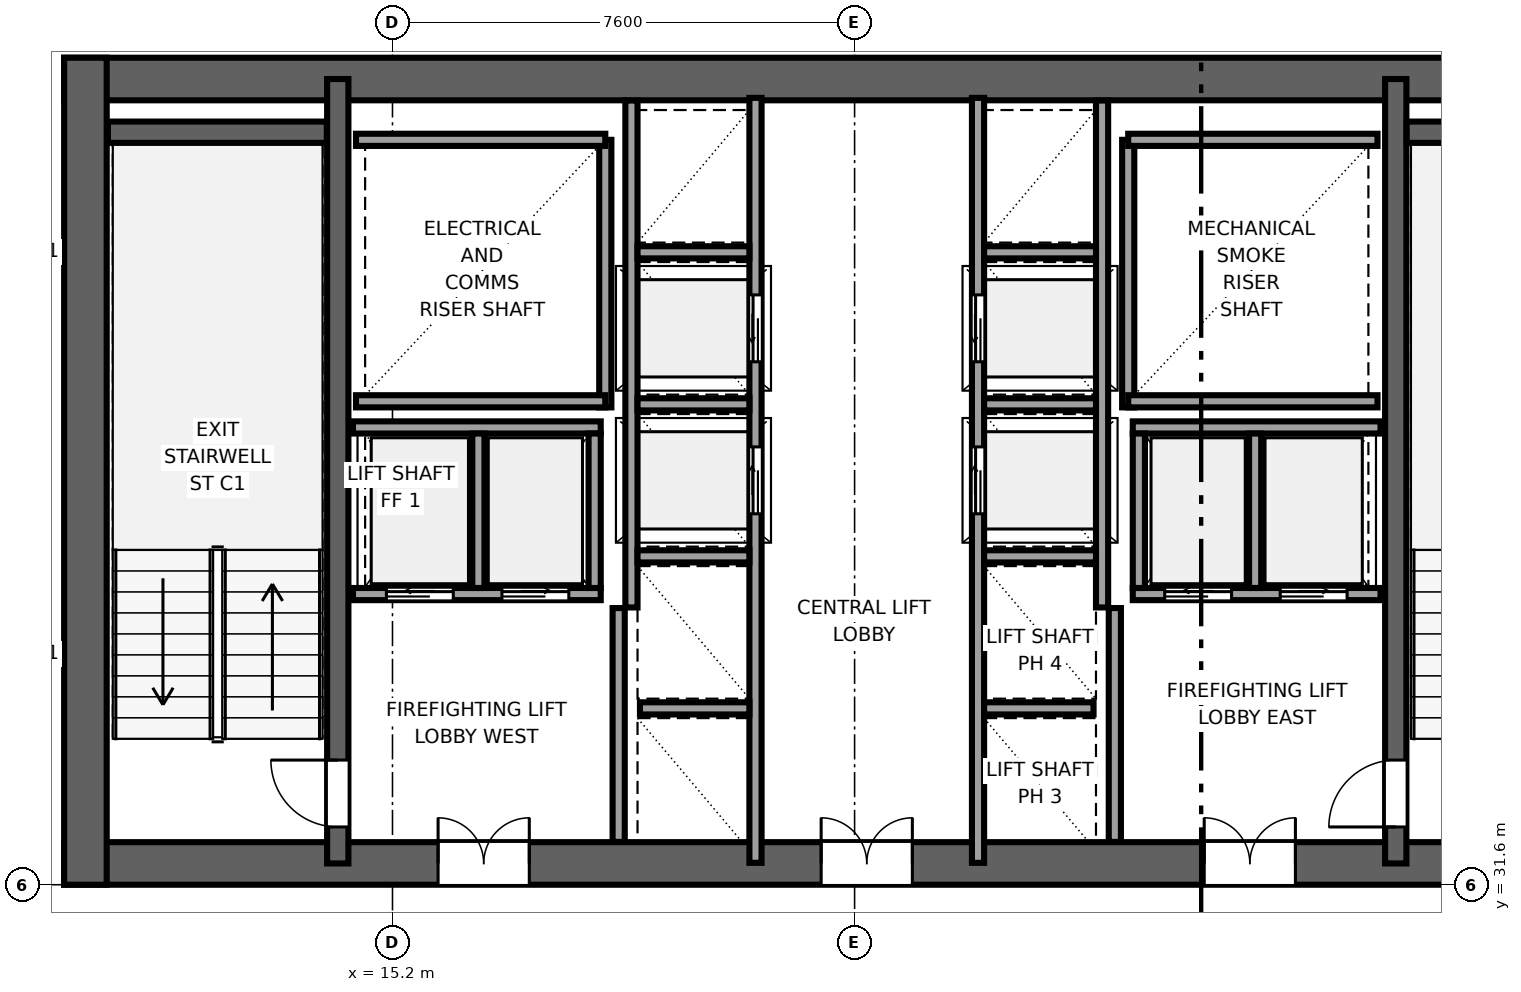
"""IFC4 building model, lengths in metres.
Left out: names, types, materials, properties, quantities, classifications, styles, units other than length and angle.
Written with IfcOpenShell. Run it as: python <this file> out.ifc"""

import sys

from ifc_helpers import new_model, si_unit, direction, frame, frame_2d, origin, place, context, subcontext, project, spatial, rectangle, extrude, source, transform, mapped, element, fill, save


model = new_model("IFC4")
c1 = context("Model", 3, precision=1e-05, world=origin(), true_north=direction((0.0, 1.0)))
c2 = subcontext(c1, "Body", "Model", "MODEL_VIEW")
j1 = project(units=[si_unit("LENGTHUNIT", "METRE"), si_unit("PLANEANGLEUNIT", "RADIAN")], contexts=[c1])
p1 = place(None, origin())
s1 = spatial("IfcSite", under=j1, at=p1, CompositionType="ELEMENT")
p2 = place(p1, origin())
s2 = spatial("IfcBuilding", under=s1, at=p2, CompositionType="ELEMENT")
p3 = place(p2, frame((0.0, 0.0, 139.95)))
s3 = spatial("IfcBuildingStorey", under=s2, at=p3, CompositionType="ELEMENT", Elevation=139.95)
p4 = place(p3, frame((9.8, 31.95, 0.0), z_axis=(0.0, 0.0, 1.0), x_axis=(1.0, 0.0, 0.0)))
e1 = element("IfcWall", 1, at=p4, inside=s3, PredefinedType="SHEAR", context=c2, shape_type="SweptSolid", body=[
    extrude(rectangle(XDim=26.4, YDim=0.7, at=frame_2d((13.2, 0.0))), origin(), (0.0, 0.0, 1.0), 3.55),
])
p5 = place(p4, frame((7.65, 0.0, 0.0), z_axis=(0.0, 0.0, 1.0), x_axis=(-1.0, 0.0, 0.0)))
e2 = element("IfcOpeningElement", 2, at=p5, cuts=e1, PredefinedType="OPENING", context=c2, shape_type="SweptSolid", body=[
    extrude(rectangle(XDim=1.5, YDim=2.04, at=frame_2d((0.75, 1.02))), frame((0.0, 0.36, 0.0), z_axis=(0.0, -1.0, 0.0), x_axis=(1.0, 0.0, 0.0)), (0.0, 0.0, 1.0), 0.72),
])
p6 = place(p4, frame((13.95, 0.0, 0.0), z_axis=(0.0, 0.0, 1.0), x_axis=(-1.0, 0.0, 0.0)))
e3 = element("IfcOpeningElement", 3, at=p6, cuts=e1, PredefinedType="OPENING", context=c2, shape_type="SweptSolid", body=[
    extrude(rectangle(XDim=1.5, YDim=2.04, at=frame_2d((0.75, 1.02))), frame((0.0, 0.36, 0.0), z_axis=(0.0, -1.0, 0.0), x_axis=(1.0, 0.0, 0.0)), (0.0, 0.0, 1.0), 0.72),
])
p7 = place(p4, frame((20.25, 0.0, 0.0), z_axis=(0.0, 0.0, 1.0), x_axis=(-1.0, 0.0, 0.0)))
e4 = element("IfcOpeningElement", 4, at=p7, cuts=e1, PredefinedType="OPENING", context=c2, shape_type="SweptSolid", body=[
    extrude(rectangle(XDim=1.5, YDim=2.04, at=frame_2d((0.75, 1.02))), frame((0.0, 0.36, 0.0), z_axis=(0.0, -1.0, 0.0), x_axis=(1.0, 0.0, 0.0)), (0.0, 0.0, 1.0), 0.72),
])
p8 = place(p3, frame((9.8, 44.85, 0.0), z_axis=(0.0, 0.0, 1.0), x_axis=(1.0, 0.0, 0.0)))
e5 = element("IfcWall", 5, at=p8, inside=s3, PredefinedType="SHEAR", context=c2, shape_type="SweptSolid", body=[
    extrude(rectangle(XDim=26.4, YDim=0.7, at=frame_2d((13.2, 0.0))), origin(), (0.0, 0.0, 1.0), 3.55),
])
p9 = place(p3, frame((10.15, 31.6, 0.0), z_axis=(0.0, 0.0, 1.0), x_axis=(0.0, 1.0, 0.0)))
e6 = element("IfcWall", 6, at=p9, inside=s3, PredefinedType="SHEAR", context=c2, shape_type="SweptSolid", body=[
    extrude(rectangle(XDim=13.6, YDim=0.7, at=frame_2d((6.8, 0.0))), origin(), (0.0, 0.0, 1.0), 3.55),
])
p10 = place(p3, frame((14.3, 31.95, 0.0), z_axis=(0.0, 0.0, 1.0), x_axis=(0.0, 1.0, 0.0)))
e7 = element("IfcWall", 7, at=p10, inside=s3, PredefinedType="SHEAR", context=c2, shape_type="SweptSolid", body=[
    extrude(rectangle(XDim=12.9, YDim=0.35, at=frame_2d((6.45, 0.0))), origin(), (0.0, 0.0, 1.0), 3.55),
])
p11 = place(p10, frame((0.6, 0.0, 0.0)))
e8 = element("IfcOpeningElement", 8, at=p11, cuts=e7, PredefinedType="OPENING", context=c2, shape_type="SweptSolid", body=[
    extrude(rectangle(XDim=1.1, YDim=2.12, at=frame_2d((0.55, 1.06))), frame((0.0, 0.185, 0.0), z_axis=(0.0, -1.0, 0.0), x_axis=(1.0, 0.0, 0.0)), (0.0, 0.0, 1.0), 0.37),
])
p12 = place(p3, frame((31.7, 31.95, 0.0), z_axis=(0.0, 0.0, 1.0), x_axis=(0.0, 1.0, 0.0)))
e9 = element("IfcWall", 9, at=p12, inside=s3, PredefinedType="SHEAR", context=c2, shape_type="SweptSolid", body=[
    extrude(rectangle(XDim=12.9, YDim=0.35, at=frame_2d((6.45, 0.0))), origin(), (0.0, 0.0, 1.0), 3.55),
])
p13 = place(p12, frame((1.7, 0.0, 0.0), z_axis=(0.0, 0.0, 1.0), x_axis=(-1.0, 0.0, 0.0)))
e10 = element("IfcOpeningElement", 10, at=p13, cuts=e9, PredefinedType="OPENING", context=c2, shape_type="SweptSolid", body=[
    extrude(rectangle(XDim=1.1, YDim=2.12, at=frame_2d((0.55, 1.06))), frame((0.0, 0.185, 0.0), z_axis=(0.0, -1.0, 0.0), x_axis=(1.0, 0.0, 0.0)), (0.0, 0.0, 1.0), 0.37),
])
for number, where, z_axis, x_axis in (
    (11, (10.52, 43.975, 0.0), (0.0, 0.0, 1.0), (1.0, 0.0, 0.0)),
    (12, (31.88, 43.975, 0.0), (0.0, 0.0, 1.0), (1.0, 0.0, 0.0)),
):
    element("IfcWall", number, at=place(p3, frame(where, z_axis=z_axis, x_axis=x_axis)), inside=s3, PredefinedType="SHEAR", context=c2, shape_type="SweptSolid", body=[
        extrude(rectangle(XDim=3.6, YDim=0.35, at=frame_2d((1.8, 0.0))), origin(), (0.0, 0.0, 1.0), 3.55),
    ])
p14 = place(p3, frame((18.7, 39.45, 0.0), z_axis=(0.0, 0.0, 1.0), x_axis=(0.0, 1.0, 0.0)))
e13 = element("IfcWall", 13, at=p14, inside=s3, PredefinedType="SOLIDWALL", context=c2, shape_type="SweptSolid", body=[
    extrude(rectangle(XDim=4.4, YDim=0.2, at=frame_2d((2.2, 0.0))), origin(), (0.0, 0.0, 1.0), 3.37),
])
for number, where, z_axis, x_axis in (
    (14, (14.6, 39.55, 0.0), (0.0, 0.0, 1.0), (1.0, 0.0, 0.0)),
    (15, (14.6, 43.85, 0.0), (0.0, 0.0, 1.0), (1.0, 0.0, 0.0)),
):
    element("IfcWall", number, at=place(p3, frame(where, z_axis=z_axis, x_axis=x_axis)), inside=s3, PredefinedType="SOLIDWALL", context=c2, shape_type="SweptSolid", body=[
        extrude(rectangle(XDim=4.1, YDim=0.2, at=frame_2d((2.05, 0.0))), origin(), (0.0, 0.0, 1.0), 3.37),
    ])
p15 = place(p3, frame((27.3, 39.45, 0.0), z_axis=(0.0, 0.0, 1.0), x_axis=(0.0, 1.0, 0.0)))
e16 = element("IfcWall", 16, at=p15, inside=s3, PredefinedType="SOLIDWALL", context=c2, shape_type="SweptSolid", body=[
    extrude(rectangle(XDim=4.4, YDim=0.2, at=frame_2d((2.2, 0.0))), origin(), (0.0, 0.0, 1.0), 3.37),
])
for number, where, z_axis, x_axis in (
    (17, (27.3, 39.55, 0.0), (0.0, 0.0, 1.0), (1.0, 0.0, 0.0)),
    (18, (27.3, 43.85, 0.0), (0.0, 0.0, 1.0), (1.0, 0.0, 0.0)),
):
    element("IfcWall", number, at=place(p3, frame(where, z_axis=z_axis, x_axis=x_axis)), inside=s3, PredefinedType="SOLIDWALL", context=c2, shape_type="SweptSolid", body=[
        extrude(rectangle(XDim=4.1, YDim=0.2, at=frame_2d((2.05, 0.0))), origin(), (0.0, 0.0, 1.0), 3.37),
    ])
for number, where, z_axis, x_axis in (
    (19, (18.92, 32.304, 0.0), (0.0, 0.0, 1.0), (0.0, 1.0, 0.0)),
    (20, (27.08, 32.304, 0.0), (0.0, 0.0, 1.0), (0.0, 1.0, 0.0)),
):
    element("IfcWall", number, at=place(p3, frame(where, z_axis=z_axis, x_axis=x_axis)), inside=s3, PredefinedType="SOLIDWALL", context=c2, shape_type="SweptSolid", body=[
        extrude(rectangle(XDim=3.846, YDim=0.2, at=frame_2d((1.923, 0.0))), origin(), (0.0, 0.0, 1.0), 3.37),
    ])
p16 = place(p3, frame((21.17, 31.96, 0.0), z_axis=(0.0, 0.0, 1.0), x_axis=(0.0, 1.0, 0.0)))
e21 = element("IfcWall", 21, at=p16, inside=s3, PredefinedType="SOLIDWALL", context=c2, shape_type="SweptSolid", body=[
    extrude(rectangle(XDim=12.58, YDim=0.2, at=frame_2d((6.29, 0.0))), origin(), (0.0, 0.0, 1.0), 3.37),
])
p17 = place(p16, frame((5.74, 0.0, 0.0)))
e22 = element("IfcOpeningElement", 22, at=p17, cuts=e21, PredefinedType="OPENING", context=c2, shape_type="SweptSolid", body=[
    extrude(rectangle(XDim=1.1, YDim=2.12, at=frame_2d((0.55, 1.06))), frame((0.0, 0.11, 0.0), z_axis=(0.0, -1.0, 0.0), x_axis=(1.0, 0.0, 0.0)), (0.0, 0.0, 1.0), 0.22),
])
p18 = place(p16, frame((8.24, 0.0, 0.0)))
e23 = element("IfcOpeningElement", 23, at=p18, cuts=e21, PredefinedType="OPENING", context=c2, shape_type="SweptSolid", body=[
    extrude(rectangle(XDim=1.1, YDim=2.12, at=frame_2d((0.55, 1.06))), frame((0.0, 0.11, 0.0), z_axis=(0.0, -1.0, 0.0), x_axis=(1.0, 0.0, 0.0)), (0.0, 0.0, 1.0), 0.22),
])
p19 = place(p3, frame((19.13, 36.16, 0.0), z_axis=(0.0, 0.0, 1.0), x_axis=(0.0, 1.0, 0.0)))
e24 = element("IfcWall", 24, at=p19, inside=s3, PredefinedType="SOLIDWALL", context=c2, shape_type="SweptSolid", body=[
    extrude(rectangle(XDim=8.336, YDim=0.2, at=frame_2d((4.168, 0.0))), origin(), (0.0, 0.0, 1.0), 3.37),
])
p20 = place(p3, frame((19.27, 34.5, 0.0), z_axis=(0.0, 0.0, 1.0), x_axis=(1.0, 0.0, 0.0)))
e25 = element("IfcWall", 25, at=p20, inside=s3, PredefinedType="SOLIDWALL", context=c2, shape_type="SweptSolid", body=[
    extrude(rectangle(XDim=1.8, YDim=0.2, at=frame_2d((0.9, 0.0))), origin(), (0.0, 0.0, 1.0), 3.37),
])
for number, where, z_axis, x_axis in (
    (26, (19.23, 37.0, 0.0), (0.0, 0.0, 1.0), (1.0, 0.0, 0.0)),
    (27, (19.23, 39.5, 0.0), (0.0, 0.0, 1.0), (1.0, 0.0, 0.0)),
    (28, (19.23, 42.0, 0.0), (0.0, 0.0, 1.0), (1.0, 0.0, 0.0)),
):
    element("IfcWall", number, at=place(p3, frame(where, z_axis=z_axis, x_axis=x_axis)), inside=s3, PredefinedType="SOLIDWALL", context=c2, shape_type="SweptSolid", body=[
        extrude(rectangle(XDim=1.84, YDim=0.2, at=frame_2d((0.92, 0.0))), origin(), (0.0, 0.0, 1.0), 3.37),
    ])
p21 = place(p3, frame((27.375, 36.38, 0.0), z_axis=(0.0, 0.0, 1.0), x_axis=(1.0, 0.0, 0.0)))
e29 = element("IfcWall", 29, at=p21, inside=s3, PredefinedType="SOLIDWALL", context=c2, shape_type="SweptSolid", body=[
    extrude(rectangle(XDim=4.075, YDim=0.2, at=frame_2d((2.038, 0.0))), origin(), (0.0, 0.0, 1.0), 3.37),
])
p22 = place(p21, frame((0.525, 0.0, 0.0)))
e30 = element("IfcOpeningElement", 30, at=p22, cuts=e29, PredefinedType="OPENING", context=c2, shape_type="SweptSolid", body=[
    extrude(rectangle(XDim=1.1, YDim=2.12, at=frame_2d((0.55, 1.06))), frame((0.0, 0.11, 0.0), z_axis=(0.0, -1.0, 0.0), x_axis=(1.0, 0.0, 0.0)), (0.0, 0.0, 1.0), 0.22),
])
p23 = place(p21, frame((2.425, 0.0, 0.0)))
e31 = element("IfcOpeningElement", 31, at=p23, cuts=e29, PredefinedType="OPENING", context=c2, shape_type="SweptSolid", body=[
    extrude(rectangle(XDim=1.1, YDim=2.12, at=frame_2d((0.55, 1.06))), frame((0.0, 0.11, 0.0), z_axis=(0.0, -1.0, 0.0), x_axis=(1.0, 0.0, 0.0)), (0.0, 0.0, 1.0), 0.22),
])
p24 = place(p3, frame((27.375, 39.12, 0.0), z_axis=(0.0, 0.0, 1.0), x_axis=(1.0, 0.0, 0.0)))
e32 = element("IfcWall", 32, at=p24, inside=s3, PredefinedType="SOLIDWALL", context=c2, shape_type="SweptSolid", body=[
    extrude(rectangle(XDim=4.075, YDim=0.2, at=frame_2d((2.038, 0.0))), origin(), (0.0, 0.0, 1.0), 3.37),
])
for number, where, z_axis, x_axis in (
    (33, (27.475, 36.48, 0.0), (0.0, 0.0, 1.0), (0.0, 1.0, 0.0)),
    (34, (29.387, 36.48, 0.0), (0.0, 0.0, 1.0), (0.0, 1.0, 0.0)),
):
    element("IfcWall", number, at=place(p3, frame(where, z_axis=z_axis, x_axis=x_axis)), inside=s3, PredefinedType="SOLIDWALL", context=c2, shape_type="SweptSolid", body=[
        extrude(rectangle(XDim=2.54, YDim=0.2, at=frame_2d((1.27, 0.0))), origin(), (0.0, 0.0, 1.0), 3.37),
    ])
p25 = place(p3, frame((14.55, 36.38, 0.0), z_axis=(0.0, 0.0, 1.0), x_axis=(1.0, 0.0, 0.0)))
e35 = element("IfcWall", 35, at=p25, inside=s3, PredefinedType="SOLIDWALL", context=c2, shape_type="SweptSolid", body=[
    extrude(rectangle(XDim=4.075, YDim=0.2, at=frame_2d((2.038, 0.0))), origin(), (0.0, 0.0, 1.0), 3.37),
])
p26 = place(p25, frame((0.55, 0.0, 0.0)))
e36 = element("IfcOpeningElement", 36, at=p26, cuts=e35, PredefinedType="OPENING", context=c2, shape_type="SweptSolid", body=[
    extrude(rectangle(XDim=1.1, YDim=2.12, at=frame_2d((0.55, 1.06))), frame((0.0, 0.11, 0.0), z_axis=(0.0, -1.0, 0.0), x_axis=(1.0, 0.0, 0.0)), (0.0, 0.0, 1.0), 0.22),
])
p27 = place(p25, frame((2.45, 0.0, 0.0)))
e37 = element("IfcOpeningElement", 37, at=p27, cuts=e35, PredefinedType="OPENING", context=c2, shape_type="SweptSolid", body=[
    extrude(rectangle(XDim=1.1, YDim=2.12, at=frame_2d((0.55, 1.06))), frame((0.0, 0.11, 0.0), z_axis=(0.0, -1.0, 0.0), x_axis=(1.0, 0.0, 0.0)), (0.0, 0.0, 1.0), 0.22),
])
p28 = place(p3, frame((14.55, 39.12, 0.0), z_axis=(0.0, 0.0, 1.0), x_axis=(1.0, 0.0, 0.0)))
e38 = element("IfcWall", 38, at=p28, inside=s3, PredefinedType="SOLIDWALL", context=c2, shape_type="SweptSolid", body=[
    extrude(rectangle(XDim=4.075, YDim=0.2, at=frame_2d((2.038, 0.0))), origin(), (0.0, 0.0, 1.0), 3.37),
])
for number, where, z_axis, x_axis in (
    (39, (18.525, 36.48, 0.0), (0.0, 0.0, 1.0), (0.0, 1.0, 0.0)),
    (40, (16.613, 36.48, 0.0), (0.0, 0.0, 1.0), (0.0, 1.0, 0.0)),
):
    element("IfcWall", number, at=place(p3, frame(where, z_axis=z_axis, x_axis=x_axis)), inside=s3, PredefinedType="SOLIDWALL", context=c2, shape_type="SweptSolid", body=[
        extrude(rectangle(XDim=2.54, YDim=0.2, at=frame_2d((1.27, 0.0))), origin(), (0.0, 0.0, 1.0), 3.37),
    ])
p29 = place(p3, frame((24.83, 31.96, 0.0), z_axis=(0.0, 0.0, 1.0), x_axis=(0.0, 1.0, 0.0)))
e41 = element("IfcWall", 41, at=p29, inside=s3, PredefinedType="SOLIDWALL", context=c2, shape_type="SweptSolid", body=[
    extrude(rectangle(XDim=12.58, YDim=0.2, at=frame_2d((6.29, 0.0))), origin(), (0.0, 0.0, 1.0), 3.37),
])
p30 = place(p29, frame((5.74, 0.0, 0.0)))
e42 = element("IfcOpeningElement", 42, at=p30, cuts=e41, PredefinedType="OPENING", context=c2, shape_type="SweptSolid", body=[
    extrude(rectangle(XDim=1.1, YDim=2.12, at=frame_2d((0.55, 1.06))), frame((0.0, 0.11, 0.0), z_axis=(0.0, -1.0, 0.0), x_axis=(1.0, 0.0, 0.0)), (0.0, 0.0, 1.0), 0.22),
])
p31 = place(p29, frame((8.24, 0.0, 0.0)))
e43 = element("IfcOpeningElement", 43, at=p31, cuts=e41, PredefinedType="OPENING", context=c2, shape_type="SweptSolid", body=[
    extrude(rectangle(XDim=1.1, YDim=2.12, at=frame_2d((0.55, 1.06))), frame((0.0, 0.11, 0.0), z_axis=(0.0, -1.0, 0.0), x_axis=(1.0, 0.0, 0.0)), (0.0, 0.0, 1.0), 0.22),
])
p32 = place(p3, frame((26.87, 36.16, 0.0), z_axis=(0.0, 0.0, 1.0), x_axis=(0.0, 1.0, 0.0)))
e44 = element("IfcWall", 44, at=p32, inside=s3, PredefinedType="SOLIDWALL", context=c2, shape_type="SweptSolid", body=[
    extrude(rectangle(XDim=8.336, YDim=0.2, at=frame_2d((4.168, 0.0))), origin(), (0.0, 0.0, 1.0), 3.37),
])
p33 = place(p3, frame((24.93, 34.5, 0.0), z_axis=(0.0, 0.0, 1.0), x_axis=(1.0, 0.0, 0.0)))
e45 = element("IfcWall", 45, at=p33, inside=s3, PredefinedType="SOLIDWALL", context=c2, shape_type="SweptSolid", body=[
    extrude(rectangle(XDim=1.8, YDim=0.2, at=frame_2d((0.9, 0.0))), origin(), (0.0, 0.0, 1.0), 3.37),
])
for number, where, z_axis, x_axis in (
    (46, (24.93, 37.0, 0.0), (0.0, 0.0, 1.0), (1.0, 0.0, 0.0)),
    (47, (24.93, 39.5, 0.0), (0.0, 0.0, 1.0), (1.0, 0.0, 0.0)),
    (48, (24.93, 42.0, 0.0), (0.0, 0.0, 1.0), (1.0, 0.0, 0.0)),
):
    element("IfcWall", number, at=place(p3, frame(where, z_axis=z_axis, x_axis=x_axis)), inside=s3, PredefinedType="SOLIDWALL", context=c2, shape_type="SweptSolid", body=[
        extrude(rectangle(XDim=1.84, YDim=0.2, at=frame_2d((0.92, 0.0))), origin(), (0.0, 0.0, 1.0), 3.37),
    ])
m1 = source(origin(), c2, "Body", "SweptSolid", [
    extrude(rectangle(XDim=1.1, YDim=2.12, at=frame_2d((0.55, 1.06))), frame((0.0, 0.025, 0.0), z_axis=(0.0, -1.0, 0.0), x_axis=(1.0, 0.0, 0.0)), (0.0, 0.0, 1.0), 0.05),
])
p34 = place(p11, origin())
e49 = element("IfcDoor", 49, at=p34, inside=s3, OperationType="SINGLE_SWING_RIGHT", PredefinedType="DOOR", context=c2, shape_type="MappedRepresentation", body=[
    mapped(m1, transform((0.0, 0.0, 0.0), x_axis=(1.0, 0.0, 0.0), y_axis=(0.0, 1.0, 0.0), z_axis=(0.0, 0.0, 1.0), scale=1.0)),
])
fill(e8, e49)
p35 = place(p13, origin())
e50 = element("IfcDoor", 50, at=p35, inside=s3, OperationType="SINGLE_SWING_LEFT", PredefinedType="DOOR", context=c2, shape_type="MappedRepresentation", body=[
    mapped(m1, transform((0.0, 0.0, 0.0), x_axis=(1.0, 0.0, 0.0), y_axis=(0.0, 1.0, 0.0), z_axis=(0.0, 0.0, 1.0), scale=1.0)),
])
fill(e10, e50)
m2 = source(origin(), c2, "Body", "SweptSolid", [
    extrude(rectangle(XDim=1.5, YDim=2.04, at=frame_2d((0.75, 1.02))), frame((0.0, 0.025, 0.0), z_axis=(0.0, -1.0, 0.0), x_axis=(1.0, 0.0, 0.0)), (0.0, 0.0, 1.0), 0.05),
])
p36 = place(p5, origin())
e51 = element("IfcDoor", 51, at=p36, inside=s3, OperationType="DOUBLE_DOOR_SINGLE_SWING", PredefinedType="DOOR", context=c2, shape_type="MappedRepresentation", body=[
    mapped(m2, transform((0.0, 0.0, 0.0), x_axis=(1.0, 0.0, 0.0), y_axis=(0.0, 1.0, 0.0), z_axis=(0.0, 0.0, 1.0), scale=1.0)),
])
fill(e2, e51)
p37 = place(p6, origin())
e52 = element("IfcDoor", 52, at=p37, inside=s3, OperationType="DOUBLE_DOOR_SINGLE_SWING", PredefinedType="DOOR", context=c2, shape_type="MappedRepresentation", body=[
    mapped(m2, transform((0.0, 0.0, 0.0), x_axis=(1.0, 0.0, 0.0), y_axis=(0.0, 1.0, 0.0), z_axis=(0.0, 0.0, 1.0), scale=1.0)),
])
fill(e3, e52)
p38 = place(p7, origin())
e53 = element("IfcDoor", 53, at=p38, inside=s3, OperationType="DOUBLE_DOOR_SINGLE_SWING", PredefinedType="DOOR", context=c2, shape_type="MappedRepresentation", body=[
    mapped(m2, transform((0.0, 0.0, 0.0), x_axis=(1.0, 0.0, 0.0), y_axis=(0.0, 1.0, 0.0), z_axis=(0.0, 0.0, 1.0), scale=1.0)),
])
fill(e4, e53)
m3 = source(origin(), c2, "Body", "SweptSolid", [
    extrude(rectangle(XDim=1.1, YDim=2.12, at=frame_2d((0.55, 1.06))), frame((0.0, 0.025, 0.0), z_axis=(0.0, -1.0, 0.0), x_axis=(1.0, 0.0, 0.0)), (0.0, 0.0, 1.0), 0.05),
])
p39 = place(p17, origin())
e54 = element("IfcDoor", 54, at=p39, inside=s3, OperationType="SLIDING_TO_RIGHT", PredefinedType="DOOR", context=c2, shape_type="MappedRepresentation", body=[
    mapped(m3, transform((0.0, 0.0, 0.0), x_axis=(1.0, 0.0, 0.0), y_axis=(0.0, 1.0, 0.0), z_axis=(0.0, 0.0, 1.0), scale=1.0)),
])
fill(e22, e54)
p40 = place(p18, origin())
e55 = element("IfcDoor", 55, at=p40, inside=s3, OperationType="SLIDING_TO_LEFT", PredefinedType="DOOR", context=c2, shape_type="MappedRepresentation", body=[
    mapped(m3, transform((0.0, 0.0, 0.0), x_axis=(1.0, 0.0, 0.0), y_axis=(0.0, 1.0, 0.0), z_axis=(0.0, 0.0, 1.0), scale=1.0)),
])
fill(e23, e55)
p41 = place(p22, origin())
e56 = element("IfcDoor", 56, at=p41, inside=s3, OperationType="SLIDING_TO_LEFT", PredefinedType="DOOR", context=c2, shape_type="MappedRepresentation", body=[
    mapped(m3, transform((0.0, 0.0, 0.0), x_axis=(1.0, 0.0, 0.0), y_axis=(0.0, 1.0, 0.0), z_axis=(0.0, 0.0, 1.0), scale=1.0)),
])
fill(e30, e56)
p42 = place(p23, origin())
e57 = element("IfcDoor", 57, at=p42, inside=s3, OperationType="SLIDING_TO_RIGHT", PredefinedType="DOOR", context=c2, shape_type="MappedRepresentation", body=[
    mapped(m3, transform((0.0, 0.0, 0.0), x_axis=(1.0, 0.0, 0.0), y_axis=(0.0, 1.0, 0.0), z_axis=(0.0, 0.0, 1.0), scale=1.0)),
])
fill(e31, e57)
p43 = place(p26, origin())
e58 = element("IfcDoor", 58, at=p43, inside=s3, OperationType="SLIDING_TO_LEFT", PredefinedType="DOOR", context=c2, shape_type="MappedRepresentation", body=[
    mapped(m3, transform((0.0, 0.0, 0.0), x_axis=(1.0, 0.0, 0.0), y_axis=(0.0, 1.0, 0.0), z_axis=(0.0, 0.0, 1.0), scale=1.0)),
])
fill(e36, e58)
p44 = place(p27, origin())
e59 = element("IfcDoor", 59, at=p44, inside=s3, OperationType="SLIDING_TO_RIGHT", PredefinedType="DOOR", context=c2, shape_type="MappedRepresentation", body=[
    mapped(m3, transform((0.0, 0.0, 0.0), x_axis=(1.0, 0.0, 0.0), y_axis=(0.0, 1.0, 0.0), z_axis=(0.0, 0.0, 1.0), scale=1.0)),
])
fill(e37, e59)
p45 = place(p30, origin())
e60 = element("IfcDoor", 60, at=p45, inside=s3, OperationType="SLIDING_TO_RIGHT", PredefinedType="DOOR", context=c2, shape_type="MappedRepresentation", body=[
    mapped(m3, transform((0.0, 0.0, 0.0), x_axis=(1.0, 0.0, 0.0), y_axis=(0.0, 1.0, 0.0), z_axis=(0.0, 0.0, 1.0), scale=1.0)),
])
fill(e42, e60)
p46 = place(p31, origin())
e61 = element("IfcDoor", 61, at=p46, inside=s3, OperationType="SLIDING_TO_LEFT", PredefinedType="DOOR", context=c2, shape_type="MappedRepresentation", body=[
    mapped(m3, transform((0.0, 0.0, 0.0), x_axis=(1.0, 0.0, 0.0), y_axis=(0.0, 1.0, 0.0), z_axis=(0.0, 0.0, 1.0), scale=1.0)),
])
fill(e43, e61)
save(model, sys.argv[1])
